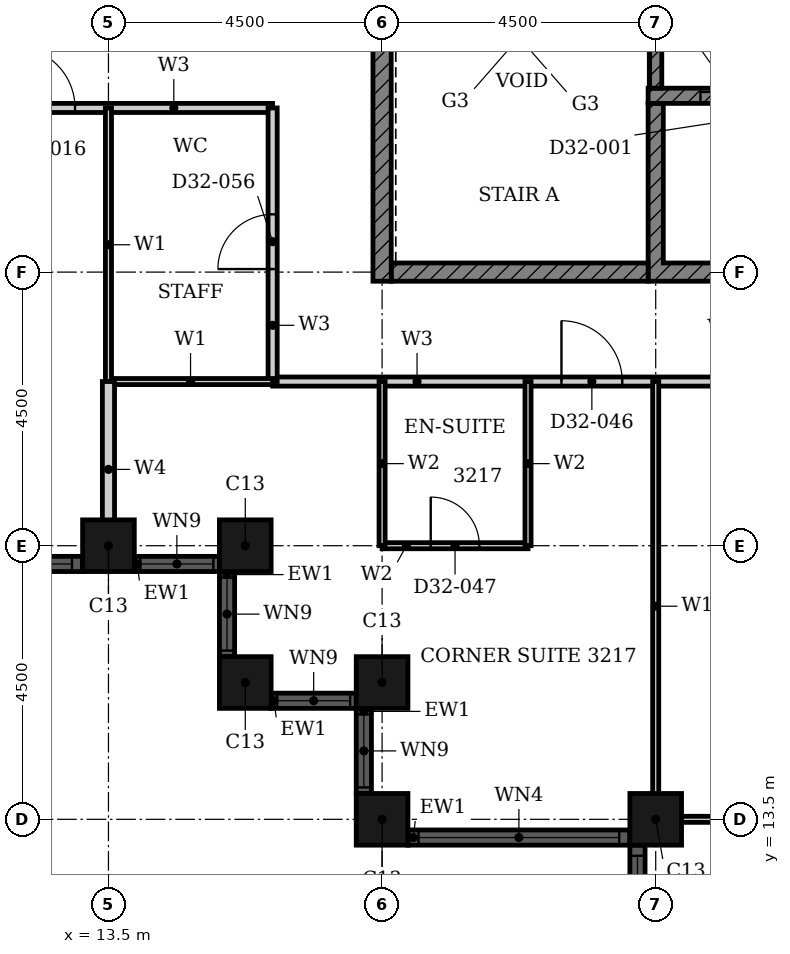
"""IFC4 building model, lengths in metres.
Left out: names, types, materials, properties, quantities, classifications, styles, units other than length and angle.
Written with IfcOpenShell. Run it as: python <this file> out.ifc"""

import sys

from ifc_helpers import new_model, si_unit, direction, frame, frame_2d, origin, origin_2d, place, context, subcontext, project, spatial, polyline, rectangle, hollow_rectangle, outline, extrude, element, fill, save


model = new_model("IFC4")
c1 = context("Model", 3, precision=1e-05, world=origin(), true_north=direction((0.0, 1.0)))
c2 = subcontext(c1, "Body", "Model", "MODEL_VIEW")
j1 = project(units=[si_unit("LENGTHUNIT", "METRE"), si_unit("PLANEANGLEUNIT", "RADIAN")], contexts=[c1])
p1 = place(None, origin())
s1 = spatial("IfcSite", under=j1, at=p1, CompositionType="ELEMENT")
p2 = place(p1, origin())
s2 = spatial("IfcBuilding", under=s1, at=p2, CompositionType="ELEMENT")
p3 = place(p2, frame((0.0, 0.0, 129.6)))
s3 = spatial("IfcBuildingStorey", under=s2, at=p3, CompositionType="ELEMENT", Elevation=129.6)
for number, where, z_axis, x_axis in (
    (1, (13.5, 18.0, 0.0), (0.0, 0.0, 1.0), (1.0, 0.0, 0.0)),
    (2, (15.75, 18.0, 0.0), (0.0, 0.0, 1.0), (1.0, 0.0, 0.0)),
    (3, (15.75, 15.75, 0.0), (0.0, 0.0, 1.0), (1.0, 0.0, 0.0)),
    (4, (18.0, 15.75, 0.0), (0.0, 0.0, 1.0), (1.0, 0.0, 0.0)),
    (5, (18.0, 13.5, 0.0), (0.0, 0.0, 1.0), (1.0, 0.0, 0.0)),
    (6, (22.5, 13.5, 0.0), (0.0, 0.0, 1.0), (1.0, 0.0, 0.0)),
):
    element("IfcColumn", number, at=place(p3, frame(where, z_axis=z_axis, x_axis=x_axis)), inside=s3, PredefinedType="COLUMN", context=c2, shape_type="SweptSolid", body=[
        extrude(hollow_rectangle(XDim=0.85, YDim=0.85, WallThickness=0.026, at=origin_2d()), origin(), (0.0, 0.0, 1.0), 3.6),
    ])
p4 = place(p3, frame((4.925, 17.7, 0.0), z_axis=(0.0, 0.0, 1.0), x_axis=(1.0, 0.0, 0.0)))
e7 = element("IfcWall", 7, at=p4, inside=s3, PredefinedType="SOLIDWALL", context=c2, shape_type="SweptSolid", body=[
    extrude(rectangle(XDim=8.15, YDim=0.25, at=frame_2d((4.075, 0.0))), origin(), (0.0, 0.0, 1.0), 3.6),
])
p5 = place(p4, frame((0.175, 0.0, 0.9)))
e8 = element("IfcOpeningElement", 8, at=p5, cuts=e7, PredefinedType="OPENING", context=c2, shape_type="SweptSolid", body=[
    extrude(rectangle(XDim=3.3, YDim=2.08, at=frame_2d((1.65, 1.04))), frame((0.0, 0.135, 0.0), z_axis=(0.0, -1.0, 0.0), x_axis=(1.0, 0.0, 0.0)), (0.0, 0.0, 1.0), 0.27),
])
p6 = place(p4, frame((4.675, 0.0, 0.9)))
e9 = element("IfcOpeningElement", 9, at=p6, cuts=e7, PredefinedType="OPENING", context=c2, shape_type="SweptSolid", body=[
    extrude(rectangle(XDim=3.3, YDim=2.08, at=frame_2d((1.65, 1.04))), frame((0.0, 0.135, 0.0), z_axis=(0.0, -1.0, 0.0), x_axis=(1.0, 0.0, 0.0)), (0.0, 0.0, 1.0), 0.27),
])
p7 = place(p3, frame((13.925, 17.7, 0.0), z_axis=(0.0, 0.0, 1.0), x_axis=(1.0, 0.0, 0.0)))
e10 = element("IfcWall", 10, at=p7, inside=s3, PredefinedType="SOLIDWALL", context=c2, shape_type="SweptSolid", body=[
    extrude(rectangle(XDim=1.4, YDim=0.25, at=frame_2d((0.7, 0.0))), origin(), (0.0, 0.0, 1.0), 3.6),
])
p8 = place(p7, frame((0.1, 0.0, 0.9)))
e11 = element("IfcOpeningElement", 11, at=p8, cuts=e10, PredefinedType="OPENING", context=c2, shape_type="SweptSolid", body=[
    extrude(rectangle(XDim=1.2, YDim=2.08, at=frame_2d((0.6, 1.04))), frame((0.0, 0.135, 0.0), z_axis=(0.0, -1.0, 0.0), x_axis=(1.0, 0.0, 0.0)), (0.0, 0.0, 1.0), 0.27),
])
p9 = place(p3, frame((15.45, 17.575, 0.0), z_axis=(0.0, 0.0, 1.0), x_axis=(0.0, -1.0, 0.0)))
e12 = element("IfcWall", 12, at=p9, inside=s3, PredefinedType="SOLIDWALL", context=c2, shape_type="SweptSolid", body=[
    extrude(rectangle(XDim=1.4, YDim=0.25, at=frame_2d((0.7, 0.0))), origin(), (0.0, 0.0, 1.0), 3.6),
])
p10 = place(p9, frame((0.1, 0.0, 0.9)))
e13 = element("IfcOpeningElement", 13, at=p10, cuts=e12, PredefinedType="OPENING", context=c2, shape_type="SweptSolid", body=[
    extrude(rectangle(XDim=1.2, YDim=2.08, at=frame_2d((0.6, 1.04))), frame((0.0, 0.135, 0.0), z_axis=(0.0, -1.0, 0.0), x_axis=(1.0, 0.0, 0.0)), (0.0, 0.0, 1.0), 0.27),
])
p11 = place(p3, frame((16.175, 15.45, 0.0), z_axis=(0.0, 0.0, 1.0), x_axis=(1.0, 0.0, 0.0)))
e14 = element("IfcWall", 14, at=p11, inside=s3, PredefinedType="SOLIDWALL", context=c2, shape_type="SweptSolid", body=[
    extrude(rectangle(XDim=1.4, YDim=0.25, at=frame_2d((0.7, 0.0))), origin(), (0.0, 0.0, 1.0), 3.6),
])
p12 = place(p11, frame((0.1, 0.0, 0.9)))
e15 = element("IfcOpeningElement", 15, at=p12, cuts=e14, PredefinedType="OPENING", context=c2, shape_type="SweptSolid", body=[
    extrude(rectangle(XDim=1.2, YDim=2.08, at=frame_2d((0.6, 1.04))), frame((0.0, 0.135, 0.0), z_axis=(0.0, -1.0, 0.0), x_axis=(1.0, 0.0, 0.0)), (0.0, 0.0, 1.0), 0.27),
])
p13 = place(p3, frame((17.7, 15.325, 0.0), z_axis=(0.0, 0.0, 1.0), x_axis=(0.0, -1.0, 0.0)))
e16 = element("IfcWall", 16, at=p13, inside=s3, PredefinedType="SOLIDWALL", context=c2, shape_type="SweptSolid", body=[
    extrude(rectangle(XDim=1.4, YDim=0.25, at=frame_2d((0.7, 0.0))), origin(), (0.0, 0.0, 1.0), 3.6),
])
p14 = place(p13, frame((0.1, 0.0, 0.9)))
e17 = element("IfcOpeningElement", 17, at=p14, cuts=e16, PredefinedType="OPENING", context=c2, shape_type="SweptSolid", body=[
    extrude(rectangle(XDim=1.2, YDim=2.08, at=frame_2d((0.6, 1.04))), frame((0.0, 0.135, 0.0), z_axis=(0.0, -1.0, 0.0), x_axis=(1.0, 0.0, 0.0)), (0.0, 0.0, 1.0), 0.27),
])
p15 = place(p3, frame((18.425, 13.2, 0.0), z_axis=(0.0, 0.0, 1.0), x_axis=(1.0, 0.0, 0.0)))
e18 = element("IfcWall", 18, at=p15, inside=s3, PredefinedType="SOLIDWALL", context=c2, shape_type="SweptSolid", body=[
    extrude(rectangle(XDim=3.65, YDim=0.25, at=frame_2d((1.825, 0.0))), origin(), (0.0, 0.0, 1.0), 3.6),
])
p16 = place(p15, frame((0.175, 0.0, 0.9)))
e19 = element("IfcOpeningElement", 19, at=p16, cuts=e18, PredefinedType="OPENING", context=c2, shape_type="SweptSolid", body=[
    extrude(rectangle(XDim=3.3, YDim=2.08, at=frame_2d((1.65, 1.04))), frame((0.0, 0.135, 0.0), z_axis=(0.0, -1.0, 0.0), x_axis=(1.0, 0.0, 0.0)), (0.0, 0.0, 1.0), 0.27),
])
p17 = place(p3, frame((22.2, 13.075, 0.0), z_axis=(0.0, 0.0, 1.0), x_axis=(0.0, -1.0, 0.0)))
e20 = element("IfcWall", 20, at=p17, inside=s3, PredefinedType="SOLIDWALL", context=c2, shape_type="SweptSolid", body=[
    extrude(rectangle(XDim=8.15, YDim=0.25, at=frame_2d((4.075, 0.0))), origin(), (0.0, 0.0, 1.0), 3.6),
])
p18 = place(p17, frame((0.175, 0.0, 0.9)))
e21 = element("IfcOpeningElement", 21, at=p18, cuts=e20, PredefinedType="OPENING", context=c2, shape_type="SweptSolid", body=[
    extrude(rectangle(XDim=3.3, YDim=2.08, at=frame_2d((1.65, 1.04))), frame((0.0, 0.135, 0.0), z_axis=(0.0, -1.0, 0.0), x_axis=(1.0, 0.0, 0.0)), (0.0, 0.0, 1.0), 0.27),
])
p19 = place(p17, frame((4.675, 0.0, 0.9)))
e22 = element("IfcOpeningElement", 22, at=p19, cuts=e20, PredefinedType="OPENING", context=c2, shape_type="SweptSolid", body=[
    extrude(rectangle(XDim=3.3, YDim=2.08, at=frame_2d((1.65, 1.04))), frame((0.0, 0.135, 0.0), z_axis=(0.0, -1.0, 0.0), x_axis=(1.0, 0.0, 0.0)), (0.0, 0.0, 1.0), 0.27),
])
p20 = place(p3, origin())
e23 = element("IfcWall", 23, at=p20, inside=s3, PredefinedType="SHEAR", context=c2, shape_type="SweptSolid", body=[
    extrude(outline(polyline([(22.375, 22.35), (38.053, 22.35), (38.053, 25.275), (37.803, 25.275), (37.803, 22.65), (35.482, 22.65), (35.482, 25.275), (35.232, 25.275), (35.232, 22.65), (32.911, 22.65), (32.911, 25.275), (32.661, 25.275), (32.661, 22.65), (30.339, 22.65), (30.339, 25.275), (30.089, 25.275), (30.089, 22.65), (27.768, 22.65), (27.768, 25.275), (27.518, 25.275), (27.518, 22.65), (25.197, 22.65), (25.197, 25.275), (24.947, 25.275), (24.947, 22.65), (22.625, 22.65), (22.625, 25.275), (22.375, 25.275), (22.375, 22.35)])), origin(), (0.0, 0.0, 1.0), 3.3),
])
p21 = place(p3, frame((18.15, 22.5, 0.0), z_axis=(0.0, 0.0, 1.0), x_axis=(1.0, 0.0, 0.0)))
e24 = element("IfcWall", 24, at=p21, inside=s3, PredefinedType="SHEAR", context=c2, shape_type="SweptSolid", body=[
    extrude(rectangle(XDim=4.225, YDim=0.3, at=frame_2d((2.113, 0.0))), origin(), (0.0, 0.0, 1.0), 3.3),
])
p22 = place(p3, frame((18.0, 22.35, 0.0), z_axis=(0.0, 0.0, 1.0), x_axis=(0.0, 1.0, 0.0)))
e25 = element("IfcWall", 25, at=p22, inside=s3, PredefinedType="SHEAR", context=c2, shape_type="SweptSolid", body=[
    extrude(rectangle(XDim=9.3, YDim=0.3, at=frame_2d((4.65, 0.0))), origin(), (0.0, 0.0, 1.0), 3.3),
])
p23 = place(p3, frame((22.375, 25.4, 0.0), z_axis=(0.0, 0.0, 1.0), x_axis=(1.0, 0.0, 0.0)))
e26 = element("IfcWall", 26, at=p23, inside=s3, PredefinedType="SHEAR", context=c2, shape_type="SweptSolid", body=[
    extrude(rectangle(XDim=15.678, YDim=0.25, at=frame_2d((7.839, 0.0))), origin(), (0.0, 0.0, 1.0), 3.3),
])
p24 = place(p23, frame((3.432, 0.0, 0.0)))
e27 = element("IfcOpeningElement", 27, at=p24, cuts=e26, PredefinedType="OPENING", context=c2, shape_type="SweptSolid", body=[
    extrude(rectangle(XDim=1.1, YDim=2.1, at=frame_2d((0.55, 1.05))), frame((0.0, 0.135, 0.0), z_axis=(0.0, -1.0, 0.0), x_axis=(1.0, 0.0, 0.0)), (0.0, 0.0, 1.0), 0.27),
])
p25 = place(p23, frame((11.146, 0.0, 0.0)))
e28 = element("IfcOpeningElement", 28, at=p25, cuts=e26, PredefinedType="OPENING", context=c2, shape_type="SweptSolid", body=[
    extrude(rectangle(XDim=1.1, YDim=2.1, at=frame_2d((0.55, 1.05))), frame((0.0, 0.135, 0.0), z_axis=(0.0, -1.0, 0.0), x_axis=(1.0, 0.0, 0.0)), (0.0, 0.0, 1.0), 0.27),
])
p26 = place(p23, frame((13.718, 0.0, 0.0)))
e29 = element("IfcOpeningElement", 29, at=p26, cuts=e26, PredefinedType="OPENING", context=c2, shape_type="SweptSolid", body=[
    extrude(rectangle(XDim=1.1, YDim=2.1, at=frame_2d((0.55, 1.05))), frame((0.0, 0.135, 0.0), z_axis=(0.0, -1.0, 0.0), x_axis=(1.0, 0.0, 0.0)), (0.0, 0.0, 1.0), 0.27),
])
p27 = place(p23, frame((0.861, 0.0, 0.0)))
e30 = element("IfcOpeningElement", 30, at=p27, cuts=e26, PredefinedType="OPENING", context=c2, shape_type="SweptSolid", body=[
    extrude(rectangle(XDim=1.1, YDim=2.1, at=frame_2d((0.55, 1.05))), frame((0.0, 0.135, 0.0), z_axis=(0.0, -1.0, 0.0), x_axis=(1.0, 0.0, 0.0)), (0.0, 0.0, 1.0), 0.27),
])
p28 = place(p3, frame((22.5, 31.35, 0.0), z_axis=(0.0, 0.0, 1.0), x_axis=(0.0, -1.0, 0.0)))
e31 = element("IfcWall", 31, at=p28, inside=s3, PredefinedType="SHEAR", context=c2, shape_type="SweptSolid", body=[
    extrude(rectangle(XDim=5.825, YDim=0.2, at=frame_2d((2.913, 0.0))), origin(), (0.0, 0.0, 1.0), 3.3),
])
p29 = place(p28, frame((0.25, 0.0, 0.0)))
e32 = element("IfcOpeningElement", 32, at=p29, cuts=e31, PredefinedType="OPENING", context=c2, shape_type="SweptSolid", body=[
    extrude(rectangle(XDim=1.8, YDim=2.1, at=frame_2d((0.9, 1.05))), frame((0.0, 0.11, 0.0), z_axis=(0.0, -1.0, 0.0), x_axis=(1.0, 0.0, 0.0)), (0.0, 0.0, 1.0), 0.22),
])
p30 = place(p3, frame((16.2, 20.7, 0.0), z_axis=(0.0, 0.0, 1.0), x_axis=(1.0, 0.0, 0.0)))
e33 = element("IfcWall", 33, at=p30, inside=s3, PredefinedType="PARTITIONING", context=c2, shape_type="SweptSolid", body=[
    extrude(rectangle(XDim=13.5, YDim=0.15, at=frame_2d((6.75, 0.0))), origin(), (0.0, 0.0, 1.0), 3.3),
])
p31 = place(p30, frame((4.75, 0.0, 0.0)))
e34 = element("IfcOpeningElement", 34, at=p31, cuts=e33, PredefinedType="OPENING", context=c2, shape_type="SweptSolid", body=[
    extrude(rectangle(XDim=1.0, YDim=2.1, at=frame_2d((0.5, 1.05))), frame((0.0, 0.085, 0.0), z_axis=(0.0, -1.0, 0.0), x_axis=(1.0, 0.0, 0.0)), (0.0, 0.0, 1.0), 0.17),
])
p32 = place(p30, frame((9.45, 0.0, 0.0)))
e35 = element("IfcOpeningElement", 35, at=p32, cuts=e33, PredefinedType="OPENING", context=c2, shape_type="SweptSolid", body=[
    extrude(rectangle(XDim=0.9, YDim=2.1, at=frame_2d((0.45, 1.05))), frame((0.0, 0.085, 0.0), z_axis=(0.0, -1.0, 0.0), x_axis=(1.0, 0.0, 0.0)), (0.0, 0.0, 1.0), 0.17),
])
p33 = place(p3, frame((9.0, 25.2, 0.0), z_axis=(0.0, 0.0, 1.0), x_axis=(1.0, 0.0, 0.0)))
e36 = element("IfcWall", 36, at=p33, inside=s3, PredefinedType="PARTITIONING", context=c2, shape_type="SweptSolid", body=[
    extrude(rectangle(XDim=7.2, YDim=0.15, at=frame_2d((3.6, 0.0))), origin(), (0.0, 0.0, 1.0), 3.3),
])
p34 = place(p33, frame((2.95, 0.0, 0.0)))
e37 = element("IfcOpeningElement", 37, at=p34, cuts=e36, PredefinedType="OPENING", context=c2, shape_type="SweptSolid", body=[
    extrude(rectangle(XDim=1.0, YDim=2.1, at=frame_2d((0.5, 1.05))), frame((0.0, 0.085, 0.0), z_axis=(0.0, -1.0, 0.0), x_axis=(1.0, 0.0, 0.0)), (0.0, 0.0, 1.0), 0.17),
])
p35 = place(p3, frame((16.2, 20.7, 0.0), z_axis=(0.0, 0.0, 1.0), x_axis=(0.0, 1.0, 0.0)))
e38 = element("IfcWall", 38, at=p35, inside=s3, PredefinedType="PARTITIONING", context=c2, shape_type="SweptSolid", body=[
    extrude(rectangle(XDim=4.5, YDim=0.15, at=frame_2d((2.25, 0.0))), origin(), (0.0, 0.0, 1.0), 3.3),
])
p36 = place(p35, frame((1.85, 0.0, 0.0)))
e39 = element("IfcOpeningElement", 39, at=p36, cuts=e38, PredefinedType="OPENING", context=c2, shape_type="SweptSolid", body=[
    extrude(rectangle(XDim=0.9, YDim=2.1, at=frame_2d((0.45, 1.05))), frame((0.0, 0.085, 0.0), z_axis=(0.0, -1.0, 0.0), x_axis=(1.0, 0.0, 0.0)), (0.0, 0.0, 1.0), 0.17),
])
p37 = place(p3, frame((22.31, 13.5, 0.0), z_axis=(0.0, 0.0, 1.0), x_axis=(1.0, 0.0, 0.0)))
e40 = element("IfcWall", 40, at=p37, inside=s3, PredefinedType="PARTITIONING", context=c2, shape_type="SweptSolid", body=[
    extrude(rectangle(XDim=7.39, YDim=0.1, at=frame_2d((3.695, 0.0))), origin(), (0.0, 0.0, 1.0), 2.38),
])
p38 = place(p3, frame((13.5, 20.7, 0.0), z_axis=(0.0, 0.0, 1.0), x_axis=(1.0, 0.0, 0.0)))
e41 = element("IfcWall", 41, at=p38, inside=s3, PredefinedType="PARTITIONING", context=c2, shape_type="SweptSolid", body=[
    extrude(rectangle(XDim=2.7, YDim=0.1, at=frame_2d((1.35, 0.0))), origin(), (0.0, 0.0, 1.0), 3.3),
])
p39 = place(p3, frame((13.5, 20.7, 0.0), z_axis=(0.0, 0.0, 1.0), x_axis=(0.0, 1.0, 0.0)))
e42 = element("IfcWall", 42, at=p39, inside=s3, PredefinedType="PARTITIONING", context=c2, shape_type="SweptSolid", body=[
    extrude(rectangle(XDim=4.5, YDim=0.1, at=frame_2d((2.25, 0.0))), origin(), (0.0, 0.0, 1.0), 2.38),
])
p40 = place(p3, frame((22.5, 13.31, 0.0), z_axis=(0.0, 0.0, 1.0), x_axis=(0.0, 1.0, 0.0)))
e43 = element("IfcWall", 43, at=p40, inside=s3, PredefinedType="PARTITIONING", context=c2, shape_type="SweptSolid", body=[
    extrude(rectangle(XDim=7.39, YDim=0.1, at=frame_2d((3.695, 0.0))), origin(), (0.0, 0.0, 1.0), 3.3),
])
p41 = place(p3, frame((13.5, 17.81, 0.0), z_axis=(0.0, 0.0, 1.0), x_axis=(0.0, 1.0, 0.0)))
e44 = element("IfcWall", 44, at=p41, inside=s3, PredefinedType="PARTITIONING", context=c2, shape_type="SweptSolid", body=[
    extrude(rectangle(XDim=2.89, YDim=0.2, at=frame_2d((1.445, 0.0))), origin(), (0.0, 0.0, 1.0), 2.38),
])
p42 = place(p3, frame((18.0, 18.0, 0.0), z_axis=(0.0, 0.0, 1.0), x_axis=(1.0, 0.0, 0.0)))
e45 = element("IfcWall", 45, at=p42, inside=s3, PredefinedType="PARTITIONING", context=c2, shape_type="SweptSolid", body=[
    extrude(rectangle(XDim=2.4, YDim=0.1, at=frame_2d((1.2, 0.0))), origin(), (0.0, 0.0, 1.0), 3.3),
])
p43 = place(p42, frame((0.8, 0.0, 0.0)))
e46 = element("IfcOpeningElement", 46, at=p43, cuts=e45, PredefinedType="OPENING", context=c2, shape_type="SweptSolid", body=[
    extrude(rectangle(XDim=0.8, YDim=2.1, at=frame_2d((0.4, 1.05))), frame((0.0, 0.06, 0.0), z_axis=(0.0, -1.0, 0.0), x_axis=(1.0, 0.0, 0.0)), (0.0, 0.0, 1.0), 0.12),
])
for number, where, z_axis, x_axis in (
    (47, (18.0, 18.0, 0.0), (0.0, 0.0, 1.0), (0.0, 1.0, 0.0)),
    (48, (20.4, 18.0, 0.0), (0.0, 0.0, 1.0), (0.0, 1.0, 0.0)),
):
    element("IfcWall", number, at=place(p3, frame(where, z_axis=z_axis, x_axis=x_axis)), inside=s3, PredefinedType="PARTITIONING", context=c2, shape_type="SweptSolid", body=[
        extrude(rectangle(XDim=2.7, YDim=0.1, at=frame_2d((1.35, 0.0))), origin(), (0.0, 0.0, 1.0), 3.3),
    ])
p44 = place(p6, origin())
e49 = element("IfcWindow", 49, at=p44, inside=s3, PartitioningType="SINGLE_PANEL", PredefinedType="WINDOW", context=c2, shape_type="SweptSolid", body=[
    extrude(rectangle(XDim=3.3, YDim=2.08, at=frame_2d((1.65, 1.04))), frame((0.0, 0.03, 0.0), z_axis=(0.0, -1.0, 0.0), x_axis=(1.0, 0.0, 0.0)), (0.0, 0.0, 1.0), 0.06),
])
fill(e9, e49)
p45 = place(p8, origin())
e50 = element("IfcWindow", 50, at=p45, inside=s3, PartitioningType="SINGLE_PANEL", PredefinedType="WINDOW", context=c2, shape_type="SweptSolid", body=[
    extrude(rectangle(XDim=1.2, YDim=2.08, at=frame_2d((0.6, 1.04))), frame((0.0, 0.03, 0.0), z_axis=(0.0, -1.0, 0.0), x_axis=(1.0, 0.0, 0.0)), (0.0, 0.0, 1.0), 0.06),
])
fill(e11, e50)
p46 = place(p10, origin())
e51 = element("IfcWindow", 51, at=p46, inside=s3, PartitioningType="SINGLE_PANEL", PredefinedType="WINDOW", context=c2, shape_type="SweptSolid", body=[
    extrude(rectangle(XDim=1.2, YDim=2.08, at=frame_2d((0.6, 1.04))), frame((0.0, 0.03, 0.0), z_axis=(0.0, -1.0, 0.0), x_axis=(1.0, 0.0, 0.0)), (0.0, 0.0, 1.0), 0.06),
])
fill(e13, e51)
p47 = place(p12, origin())
e52 = element("IfcWindow", 52, at=p47, inside=s3, PartitioningType="SINGLE_PANEL", PredefinedType="WINDOW", context=c2, shape_type="SweptSolid", body=[
    extrude(rectangle(XDim=1.2, YDim=2.08, at=frame_2d((0.6, 1.04))), frame((0.0, 0.03, 0.0), z_axis=(0.0, -1.0, 0.0), x_axis=(1.0, 0.0, 0.0)), (0.0, 0.0, 1.0), 0.06),
])
fill(e15, e52)
p48 = place(p14, origin())
e53 = element("IfcWindow", 53, at=p48, inside=s3, PartitioningType="SINGLE_PANEL", PredefinedType="WINDOW", context=c2, shape_type="SweptSolid", body=[
    extrude(rectangle(XDim=1.2, YDim=2.08, at=frame_2d((0.6, 1.04))), frame((0.0, 0.03, 0.0), z_axis=(0.0, -1.0, 0.0), x_axis=(1.0, 0.0, 0.0)), (0.0, 0.0, 1.0), 0.06),
])
fill(e17, e53)
p49 = place(p16, origin())
e54 = element("IfcWindow", 54, at=p49, inside=s3, PartitioningType="SINGLE_PANEL", PredefinedType="WINDOW", context=c2, shape_type="SweptSolid", body=[
    extrude(rectangle(XDim=3.3, YDim=2.08, at=frame_2d((1.65, 1.04))), frame((0.0, 0.03, 0.0), z_axis=(0.0, -1.0, 0.0), x_axis=(1.0, 0.0, 0.0)), (0.0, 0.0, 1.0), 0.06),
])
fill(e19, e54)
p50 = place(p18, origin())
e55 = element("IfcWindow", 55, at=p50, inside=s3, PartitioningType="SINGLE_PANEL", PredefinedType="WINDOW", context=c2, shape_type="SweptSolid", body=[
    extrude(rectangle(XDim=3.3, YDim=2.08, at=frame_2d((1.65, 1.04))), frame((0.0, 0.03, 0.0), z_axis=(0.0, -1.0, 0.0), x_axis=(1.0, 0.0, 0.0)), (0.0, 0.0, 1.0), 0.06),
])
fill(e21, e55)
p51 = place(p27, origin())
e56 = element("IfcDoor", 56, at=p51, inside=s3, OperationType="DOUBLE_DOOR_SLIDING", PredefinedType="DOOR", context=c2, shape_type="SweptSolid", body=[
    extrude(rectangle(XDim=1.1, YDim=2.1, at=frame_2d((0.55, 1.05))), frame((0.0, 0.025, 0.0), z_axis=(0.0, -1.0, 0.0), x_axis=(1.0, 0.0, 0.0)), (0.0, 0.0, 1.0), 0.05),
])
fill(e30, e56)
p52 = place(p34, origin())
e57 = element("IfcDoor", 57, at=p52, inside=s3, OperationType="SINGLE_SWING_RIGHT", PredefinedType="DOOR", context=c2, shape_type="SweptSolid", body=[
    extrude(rectangle(XDim=1.0, YDim=2.1, at=frame_2d((0.5, 1.05))), frame((0.0, 0.025, 0.0), z_axis=(0.0, -1.0, 0.0), x_axis=(1.0, 0.0, 0.0)), (0.0, 0.0, 1.0), 0.05),
])
fill(e37, e57)
p53 = place(p31, origin())
e58 = element("IfcDoor", 58, at=p53, inside=s3, OperationType="SINGLE_SWING_RIGHT", PredefinedType="DOOR", context=c2, shape_type="SweptSolid", body=[
    extrude(rectangle(XDim=1.0, YDim=2.1, at=frame_2d((0.5, 1.05))), frame((0.0, 0.025, 0.0), z_axis=(0.0, -1.0, 0.0), x_axis=(1.0, 0.0, 0.0)), (0.0, 0.0, 1.0), 0.05),
])
fill(e34, e58)
p54 = place(p43, origin())
e59 = element("IfcDoor", 59, at=p54, inside=s3, OperationType="SINGLE_SWING_LEFT", PredefinedType="DOOR", context=c2, shape_type="SweptSolid", body=[
    extrude(rectangle(XDim=0.8, YDim=2.1, at=frame_2d((0.4, 1.05))), frame((0.0, 0.025, 0.0), z_axis=(0.0, -1.0, 0.0), x_axis=(1.0, 0.0, 0.0)), (0.0, 0.0, 1.0), 0.05),
])
fill(e46, e59)
p55 = place(p36, origin())
e60 = element("IfcDoor", 60, at=p55, inside=s3, OperationType="SINGLE_SWING_LEFT", PredefinedType="DOOR", context=c2, shape_type="SweptSolid", body=[
    extrude(rectangle(XDim=0.9, YDim=2.1, at=frame_2d((0.45, 1.05))), frame((0.0, 0.025, 0.0), z_axis=(0.0, -1.0, 0.0), x_axis=(1.0, 0.0, 0.0)), (0.0, 0.0, 1.0), 0.05),
])
fill(e39, e60)
save(model, sys.argv[1])
